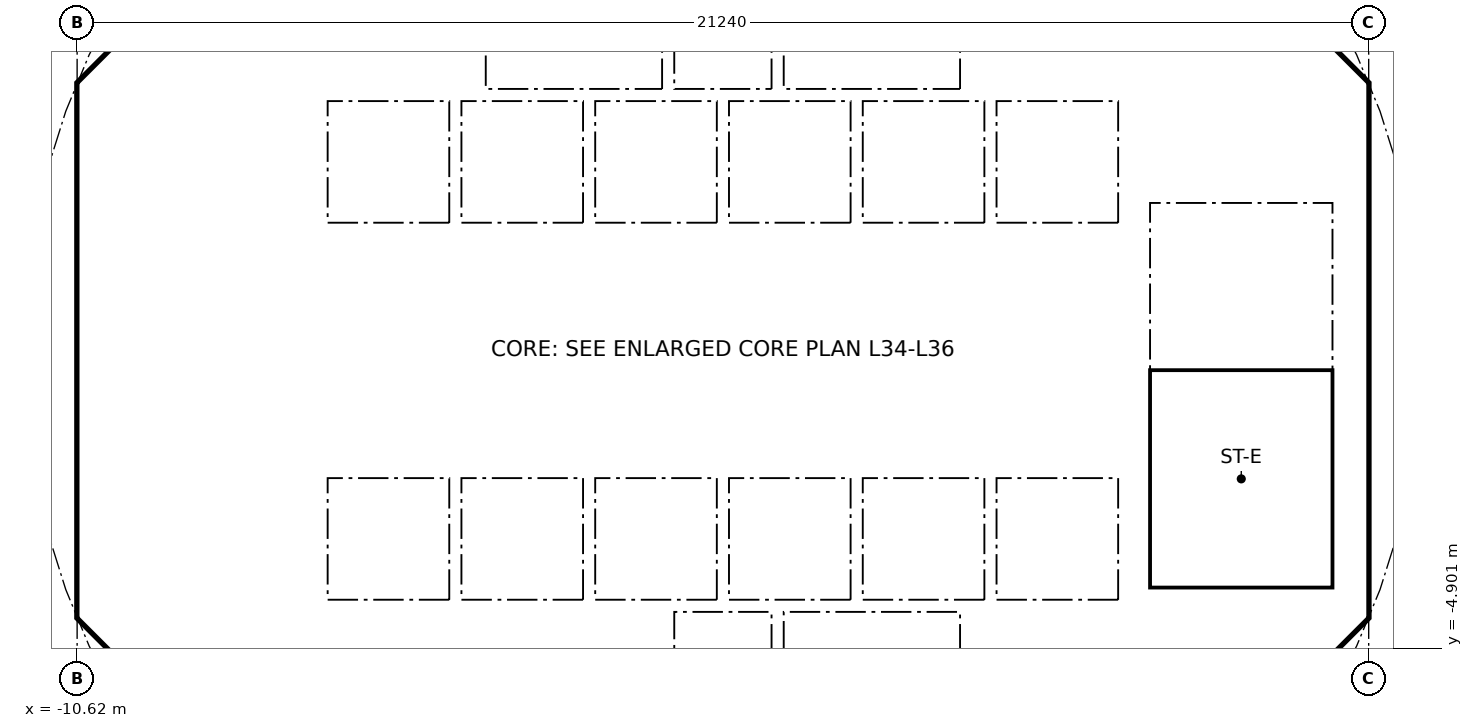
"""IFC4 building model, lengths in metres.
Left out: names, types, materials, properties, quantities, classifications, styles, units other than length and angle.
Written with IfcOpenShell. Run it as: python <this file> out.ifc"""

import sys

from ifc_helpers import new_model, si_unit, direction, frame, frame_2d, origin, place, context, subcontext, project, spatial, polyline, rectangle, outline, extrude, element, fill, save


model = new_model("IFC4")
c1 = context("Model", 3, precision=1e-05, world=origin(), true_north=direction((0.0, 1.0)))
c2 = subcontext(c1, "Body", "Model", "MODEL_VIEW")
j1 = project(units=[si_unit("LENGTHUNIT", "METRE"), si_unit("PLANEANGLEUNIT", "RADIAN")], contexts=[c1])
p1 = place(None, origin())
s1 = spatial("IfcSite", under=j1, at=p1, CompositionType="ELEMENT")
p2 = place(p1, origin())
s2 = spatial("IfcBuilding", under=s1, at=p2, CompositionType="ELEMENT")
p3 = place(p2, frame((0.0, 0.0, 145.5)))
s3 = spatial("IfcBuildingStorey", under=s2, at=p3, CompositionType="ELEMENT", Elevation=145.5)
p4 = place(p3, frame((9.988, 4.613, 0.0), z_axis=(0.0, 0.0, 1.0), x_axis=(-0.707106781187, 0.707106781187, 0.0)))
e1 = element("IfcWall", 1, at=p4, inside=s3, PredefinedType="SHEAR", context=c2, shape_type="SweptSolid", body=[
    extrude(rectangle(XDim=7.602, YDim=0.6, at=frame_2d((3.801, 0.0))), origin(), (0.0, 0.0, 1.0), 3.44),
])
p5 = place(p4, frame((3.201, 0.0, 0.0)))
e2 = element("IfcOpeningElement", 2, at=p5, cuts=e1, PredefinedType="OPENING", context=c2, shape_type="SweptSolid", body=[
    extrude(rectangle(XDim=1.2, YDim=2.1, at=frame_2d((0.6, 1.05))), frame((0.0, 0.31, 0.0), z_axis=(0.0, -1.0, 0.0), x_axis=(1.0, 0.0, 0.0)), (0.0, 0.0, 1.0), 0.62),
])
p6 = place(p3, frame((-4.613, 9.988, 0.0), z_axis=(0.0, 0.0, 1.0), x_axis=(-0.707106781187, -0.707106781187, 0.0)))
e3 = element("IfcWall", 3, at=p6, inside=s3, PredefinedType="SHEAR", context=c2, shape_type="SweptSolid", body=[
    extrude(rectangle(XDim=7.602, YDim=0.6, at=frame_2d((3.801, 0.0))), origin(), (0.0, 0.0, 1.0), 3.44),
])
p7 = place(p6, frame((0.351, 0.0, 0.0)))
e4 = element("IfcOpeningElement", 4, at=p7, cuts=e3, PredefinedType="OPENING", context=c2, shape_type="SweptSolid", body=[
    extrude(rectangle(XDim=1.1, YDim=2.1, at=frame_2d((0.55, 1.05))), frame((0.0, 0.31, 0.0), z_axis=(0.0, -1.0, 0.0), x_axis=(1.0, 0.0, 0.0)), (0.0, 0.0, 1.0), 0.62),
])
p8 = place(p3, frame((-10.325, 3.801, 0.0), z_axis=(0.0, 0.0, 1.0), x_axis=(0.0, -1.0, 0.0)))
e5 = element("IfcWall", 5, at=p8, inside=s3, PredefinedType="SHEAR", context=c2, shape_type="SweptSolid", body=[
    extrude(rectangle(XDim=7.602, YDim=0.6, at=frame_2d((3.801, 0.0))), origin(), (0.0, 0.0, 1.0), 3.44),
])
p9 = place(p8, frame((0.651, 0.0, 0.0)))
e6 = element("IfcOpeningElement", 6, at=p9, cuts=e5, PredefinedType="OPENING", context=c2, shape_type="SweptSolid", body=[
    extrude(rectangle(XDim=1.5, YDim=2.1, at=frame_2d((0.75, 1.05))), frame((0.0, 0.31, 0.0), z_axis=(0.0, -1.0, 0.0), x_axis=(1.0, 0.0, 0.0)), (0.0, 0.0, 1.0), 0.62),
])
p10 = place(p8, frame((5.451, 0.0, 0.0)))
e7 = element("IfcOpeningElement", 7, at=p10, cuts=e5, PredefinedType="OPENING", context=c2, shape_type="SweptSolid", body=[
    extrude(rectangle(XDim=1.5, YDim=2.1, at=frame_2d((0.75, 1.05))), frame((0.0, 0.31, 0.0), z_axis=(0.0, -1.0, 0.0), x_axis=(1.0, 0.0, 0.0)), (0.0, 0.0, 1.0), 0.62),
])
p11 = place(p3, frame((-9.988, -4.613, 0.0), z_axis=(0.0, 0.0, 1.0), x_axis=(0.707106781187, -0.707106781187, 0.0)))
e8 = element("IfcWall", 8, at=p11, inside=s3, PredefinedType="SHEAR", context=c2, shape_type="SweptSolid", body=[
    extrude(rectangle(XDim=7.602, YDim=0.6, at=frame_2d((3.801, 0.0))), origin(), (0.0, 0.0, 1.0), 3.44),
])
p12 = place(p11, frame((6.151, 0.0, 0.0)))
e9 = element("IfcOpeningElement", 9, at=p12, cuts=e8, PredefinedType="OPENING", context=c2, shape_type="SweptSolid", body=[
    extrude(rectangle(XDim=1.1, YDim=2.1, at=frame_2d((0.55, 1.05))), frame((0.0, 0.31, 0.0), z_axis=(0.0, -1.0, 0.0), x_axis=(1.0, 0.0, 0.0)), (0.0, 0.0, 1.0), 0.62),
])
p13 = place(p3, frame((4.613, -9.988, 0.0), z_axis=(0.0, 0.0, 1.0), x_axis=(0.707106781187, 0.707106781187, 0.0)))
e10 = element("IfcWall", 10, at=p13, inside=s3, PredefinedType="SHEAR", context=c2, shape_type="SweptSolid", body=[
    extrude(rectangle(XDim=7.602, YDim=0.6, at=frame_2d((3.801, 0.0))), origin(), (0.0, 0.0, 1.0), 3.44),
])
p14 = place(p13, frame((3.201, 0.0, 0.0)))
e11 = element("IfcOpeningElement", 11, at=p14, cuts=e10, PredefinedType="OPENING", context=c2, shape_type="SweptSolid", body=[
    extrude(rectangle(XDim=1.2, YDim=2.1, at=frame_2d((0.6, 1.05))), frame((0.0, 0.31, 0.0), z_axis=(0.0, -1.0, 0.0), x_axis=(1.0, 0.0, 0.0)), (0.0, 0.0, 1.0), 0.62),
])
p15 = place(p3, frame((-5.8, 4.3, 0.0), z_axis=(0.0, 0.0, 1.0), x_axis=(0.0, 1.0, 0.0)))
e12 = element("IfcWall", 12, at=p15, inside=s3, PredefinedType="PARTITIONING", context=c2, shape_type="SweptSolid", body=[
    extrude(rectangle(XDim=3.927, YDim=0.15, at=frame_2d((1.963, 0.0))), origin(), (0.0, 0.0, 1.0), 3.44),
])
p16 = place(p15, frame((0.413, 0.0, 0.0)))
e13 = element("IfcOpeningElement", 13, at=p16, cuts=e12, PredefinedType="OPENING", context=c2, shape_type="SweptSolid", body=[
    extrude(rectangle(XDim=0.9, YDim=2.1, at=frame_2d((0.45, 1.05))), frame((0.0, 0.085, 0.0), z_axis=(0.0, -1.0, 0.0), x_axis=(1.0, 0.0, 0.0)), (0.0, 0.0, 1.0), 0.17),
])
p17 = place(p15, frame((2.489, 0.0, 0.0)))
e14 = element("IfcOpeningElement", 14, at=p17, cuts=e12, PredefinedType="OPENING", context=c2, shape_type="SweptSolid", body=[
    extrude(rectangle(XDim=0.9, YDim=2.1, at=frame_2d((0.45, 1.05))), frame((0.0, 0.085, 0.0), z_axis=(0.0, -1.0, 0.0), x_axis=(1.0, 0.0, 0.0)), (0.0, 0.0, 1.0), 0.17),
])
p18 = place(p3, frame((4.0, 4.3, 0.0), z_axis=(0.0, 0.0, 1.0), x_axis=(0.0, 1.0, 0.0)))
e15 = element("IfcWall", 15, at=p18, inside=s3, PredefinedType="SOLIDWALL", context=c2, shape_type="SweptSolid", body=[
    extrude(rectangle(XDim=2.2, YDim=0.2, at=frame_2d((1.1, 0.0))), origin(), (0.0, 0.0, 1.0), 3.44),
])
p19 = place(p18, frame((0.55, 0.0, 0.0)))
e16 = element("IfcOpeningElement", 16, at=p19, cuts=e15, PredefinedType="OPENING", context=c2, shape_type="SweptSolid", body=[
    extrude(rectangle(XDim=1.1, YDim=2.1, at=frame_2d((0.55, 1.05))), frame((0.0, 0.11, 0.0), z_axis=(0.0, -1.0, 0.0), x_axis=(1.0, 0.0, 0.0)), (0.0, 0.0, 1.0), 0.22),
])
p20 = place(p3, frame((-4.0, 4.3, 0.0), z_axis=(0.0, 0.0, 1.0), x_axis=(0.0, 1.0, 0.0)))
e17 = element("IfcWall", 17, at=p20, inside=s3, PredefinedType="SOLIDWALL", context=c2, shape_type="SweptSolid", body=[
    extrude(rectangle(XDim=2.2, YDim=0.2, at=frame_2d((1.1, 0.0))), origin(), (0.0, 0.0, 1.0), 3.44),
])
p21 = place(p20, frame((0.55, 0.0, 0.0)))
e18 = element("IfcOpeningElement", 18, at=p21, cuts=e17, PredefinedType="OPENING", context=c2, shape_type="SweptSolid", body=[
    extrude(rectangle(XDim=1.1, YDim=2.1, at=frame_2d((0.55, 1.05))), frame((0.0, 0.11, 0.0), z_axis=(0.0, -1.0, 0.0), x_axis=(1.0, 0.0, 0.0)), (0.0, 0.0, 1.0), 0.22),
])
p22 = place(p3, frame((-6.7, 2.0, 0.0), z_axis=(0.0, 0.0, 1.0), x_axis=(1.0, 0.0, 0.0)))
e19 = element("IfcWall", 19, at=p22, inside=s3, PredefinedType="SOLIDWALL", context=c2, shape_type="SweptSolid", body=[
    extrude(rectangle(XDim=13.4, YDim=0.2, at=frame_2d((6.7, 0.0))), origin(), (0.0, 0.0, 1.0), 3.44),
])
p23 = place(p22, frame((0.65, 0.0, 0.0)))
e20 = element("IfcOpeningElement", 20, at=p23, cuts=e19, PredefinedType="OPENING", context=c2, shape_type="SweptSolid", body=[
    extrude(rectangle(XDim=1.1, YDim=2.1, at=frame_2d((0.55, 1.05))), frame((0.0, 0.11, 0.0), z_axis=(0.0, -1.0, 0.0), x_axis=(1.0, 0.0, 0.0)), (0.0, 0.0, 1.0), 0.22),
])
p24 = place(p22, frame((2.85, 0.0, 0.0)))
e21 = element("IfcOpeningElement", 21, at=p24, cuts=e19, PredefinedType="OPENING", context=c2, shape_type="SweptSolid", body=[
    extrude(rectangle(XDim=1.1, YDim=2.1, at=frame_2d((0.55, 1.05))), frame((0.0, 0.11, 0.0), z_axis=(0.0, -1.0, 0.0), x_axis=(1.0, 0.0, 0.0)), (0.0, 0.0, 1.0), 0.22),
])
p25 = place(p22, frame((5.05, 0.0, 0.0)))
e22 = element("IfcOpeningElement", 22, at=p25, cuts=e19, PredefinedType="OPENING", context=c2, shape_type="SweptSolid", body=[
    extrude(rectangle(XDim=1.1, YDim=2.1, at=frame_2d((0.55, 1.05))), frame((0.0, 0.11, 0.0), z_axis=(0.0, -1.0, 0.0), x_axis=(1.0, 0.0, 0.0)), (0.0, 0.0, 1.0), 0.22),
])
p26 = place(p3, frame((6.7, 4.0, 0.0), z_axis=(0.0, 0.0, 1.0), x_axis=(1.0, 0.0, 0.0)))
e23 = element("IfcWall", 23, at=p26, inside=s3, PredefinedType="SOLIDWALL", context=c2, shape_type="SweptSolid", body=[
    extrude(rectangle(XDim=3.325, YDim=0.2, at=frame_2d((1.662, 0.0))), origin(), (0.0, 0.0, 1.0), 3.44),
])
p27 = place(p26, frame((1.25, 0.0, 0.0)))
e24 = element("IfcOpeningElement", 24, at=p27, cuts=e23, PredefinedType="OPENING", context=c2, shape_type="SweptSolid", body=[
    extrude(rectangle(XDim=1.1, YDim=2.1, at=frame_2d((0.55, 1.05))), frame((0.0, 0.11, 0.0), z_axis=(0.0, -1.0, 0.0), x_axis=(1.0, 0.0, 0.0)), (0.0, 0.0, 1.0), 0.22),
])
p28 = place(p3, frame((-7.0, -7.027, 0.0), z_axis=(0.0, 0.0, 1.0), x_axis=(0.0, 1.0, 0.0)))
e25 = element("IfcWall", 25, at=p28, inside=s3, PredefinedType="PARTITIONING", context=c2, shape_type="SweptSolid", body=[
    extrude(rectangle(XDim=2.927, YDim=0.15, at=frame_2d((1.463, 0.0))), origin(), (0.0, 0.0, 1.0), 3.44),
])
p29 = place(p28, frame((0.976, 0.0, 0.0)))
e26 = element("IfcOpeningElement", 26, at=p29, cuts=e25, PredefinedType="OPENING", context=c2, shape_type="SweptSolid", body=[
    extrude(rectangle(XDim=0.9, YDim=2.1, at=frame_2d((0.45, 1.05))), frame((0.0, 0.085, 0.0), z_axis=(0.0, -1.0, 0.0), x_axis=(1.0, 0.0, 0.0)), (0.0, 0.0, 1.0), 0.17),
])
p30 = place(p3, frame((4.0, -6.5, 0.0), z_axis=(0.0, 0.0, 1.0), x_axis=(0.0, 1.0, 0.0)))
e27 = element("IfcWall", 27, at=p30, inside=s3, PredefinedType="SOLIDWALL", context=c2, shape_type="SweptSolid", body=[
    extrude(rectangle(XDim=2.2, YDim=0.2, at=frame_2d((1.1, 0.0))), origin(), (0.0, 0.0, 1.0), 3.44),
])
p31 = place(p30, frame((0.55, 0.0, 0.0)))
e28 = element("IfcOpeningElement", 28, at=p31, cuts=e27, PredefinedType="OPENING", context=c2, shape_type="SweptSolid", body=[
    extrude(rectangle(XDim=1.1, YDim=2.1, at=frame_2d((0.55, 1.05))), frame((0.0, 0.11, 0.0), z_axis=(0.0, -1.0, 0.0), x_axis=(1.0, 0.0, 0.0)), (0.0, 0.0, 1.0), 0.22),
])
p32 = place(p3, frame((-4.0, -6.5, 0.0), z_axis=(0.0, 0.0, 1.0), x_axis=(0.0, 1.0, 0.0)))
e29 = element("IfcWall", 29, at=p32, inside=s3, PredefinedType="SOLIDWALL", context=c2, shape_type="SweptSolid", body=[
    extrude(rectangle(XDim=2.2, YDim=0.2, at=frame_2d((1.1, 0.0))), origin(), (0.0, 0.0, 1.0), 3.44),
])
p33 = place(p32, frame((0.65, 0.0, 0.0)))
e30 = element("IfcOpeningElement", 30, at=p33, cuts=e29, PredefinedType="OPENING", context=c2, shape_type="SweptSolid", body=[
    extrude(rectangle(XDim=0.9, YDim=2.1, at=frame_2d((0.45, 1.05))), frame((0.0, 0.11, 0.0), z_axis=(0.0, -1.0, 0.0), x_axis=(1.0, 0.0, 0.0)), (0.0, 0.0, 1.0), 0.22),
])
p34 = place(p3, frame((-6.7, -2.0, 0.0), z_axis=(0.0, 0.0, 1.0), x_axis=(1.0, 0.0, 0.0)))
e31 = element("IfcWall", 31, at=p34, inside=s3, PredefinedType="SOLIDWALL", context=c2, shape_type="SweptSolid", body=[
    extrude(rectangle(XDim=13.4, YDim=0.2, at=frame_2d((6.7, 0.0))), origin(), (0.0, 0.0, 1.0), 3.44),
])
p35 = place(p34, frame((0.65, 0.0, 0.0)))
e32 = element("IfcOpeningElement", 32, at=p35, cuts=e31, PredefinedType="OPENING", context=c2, shape_type="SweptSolid", body=[
    extrude(rectangle(XDim=1.1, YDim=2.1, at=frame_2d((0.55, 1.05))), frame((0.0, 0.11, 0.0), z_axis=(0.0, -1.0, 0.0), x_axis=(1.0, 0.0, 0.0)), (0.0, 0.0, 1.0), 0.22),
])
p36 = place(p34, frame((2.85, 0.0, 0.0)))
e33 = element("IfcOpeningElement", 33, at=p36, cuts=e31, PredefinedType="OPENING", context=c2, shape_type="SweptSolid", body=[
    extrude(rectangle(XDim=1.1, YDim=2.1, at=frame_2d((0.55, 1.05))), frame((0.0, 0.11, 0.0), z_axis=(0.0, -1.0, 0.0), x_axis=(1.0, 0.0, 0.0)), (0.0, 0.0, 1.0), 0.22),
])
p37 = place(p3, origin())
e34 = element("IfcWall", 34, at=p37, inside=s3, PredefinedType="SHEAR", context=c2, shape_type="SweptSolid", body=[
    extrude(outline(polyline([(-10.625, -3.801), (-10.025, -3.801), (-10.025, -4.152), (-9.776, -4.401), (-10.2, -4.825), (-10.625, -4.401), (-10.625, -3.801)])), origin(), (0.0, 0.0, 1.0), 3.44),
])
p38 = place(p3, origin())
e35 = element("IfcWall", 35, at=p38, inside=s3, PredefinedType="SHEAR", context=c2, shape_type="SweptSolid", body=[
    extrude(outline(polyline([(-10.2, 4.825), (-9.776, 4.401), (-10.025, 4.152), (-10.025, 3.801), (-10.625, 3.801), (-10.625, 4.401), (-10.2, 4.825)])), origin(), (0.0, 0.0, 1.0), 3.44),
])
p39 = place(p3, origin())
e36 = element("IfcWall", 36, at=p39, inside=s3, PredefinedType="SHEAR", context=c2, shape_type="SweptSolid", body=[
    extrude(outline(polyline([(9.776, -4.401), (10.025, -4.152), (10.025, -3.801), (10.025, 4.152), (9.776, 4.401), (10.2, 4.825), (10.625, 4.401), (10.625, -4.401), (10.2, -4.825), (9.776, -4.401)])), origin(), (0.0, 0.0, 1.0), 3.44),
])
for number, where, z_axis, x_axis in (
    (37, (-10.025, -4.0, 0.0), (0.0, 0.0, 1.0), (1.0, 0.0, 0.0)),
    (38, (-10.025, 4.0, 0.0), (0.0, 0.0, 1.0), (1.0, 0.0, 0.0)),
):
    element("IfcWall", number, at=place(p3, frame(where, z_axis=z_axis, x_axis=x_axis)), inside=s3, PredefinedType="PARTITIONING", context=c2, shape_type="SweptSolid", body=[
        extrude(rectangle(XDim=3.325, YDim=0.2, at=frame_2d((1.662, 0.0))), origin(), (0.0, 0.0, 1.0), 3.44),
    ])
for number, where, z_axis, x_axis in (
    (39, (-0.9, -6.5, 0.0), (0.0, 0.0, 1.0), (0.0, 1.0, 0.0)),
    (40, (0.9, -6.5, 0.0), (0.0, 0.0, 1.0), (0.0, 1.0, 0.0)),
):
    element("IfcWall", number, at=place(p3, frame(where, z_axis=z_axis, x_axis=x_axis)), inside=s3, PredefinedType="SOLIDWALL", context=c2, shape_type="SweptSolid", body=[
        extrude(rectangle(XDim=2.2, YDim=0.2, at=frame_2d((1.1, 0.0))), origin(), (0.0, 0.0, 1.0), 3.44),
    ])
p40 = place(p3, origin())
e41 = element("IfcWall", 41, at=p40, inside=s3, PredefinedType="SOLIDWALL", context=c2, shape_type="SweptSolid", body=[
    extrude(outline(polyline([(-6.7, -2.1), (-6.5, -2.1), (-6.5, -4.1), (-4.5, -4.1), (-4.5, -2.1), (-4.3, -2.1), (-4.3, -4.1), (-2.3, -4.1), (-2.3, -2.1), (-2.1, -2.1), (-2.1, -4.1), (-0.1, -4.1), (-0.1, -2.1), (0.1, -2.1), (0.1, -4.1), (2.1, -4.1), (2.1, -2.1), (2.3, -2.1), (2.3, -4.1), (4.3, -4.1), (4.3, -2.1), (4.5, -2.1), (4.5, -4.1), (6.5, -4.1), (6.5, -2.1), (6.7, -2.1), (6.7, -4.3), (-6.7, -4.3), (-6.7, -2.1)])), origin(), (0.0, 0.0, 1.0), 3.44),
])
for number, where, z_axis, x_axis in (
    (42, (-0.9, 4.3, 0.0), (0.0, 0.0, 1.0), (0.0, 1.0, 0.0)),
    (43, (0.9, 4.3, 0.0), (0.0, 0.0, 1.0), (0.0, 1.0, 0.0)),
):
    element("IfcWall", number, at=place(p3, frame(where, z_axis=z_axis, x_axis=x_axis)), inside=s3, PredefinedType="SOLIDWALL", context=c2, shape_type="SweptSolid", body=[
        extrude(rectangle(XDim=2.2, YDim=0.2, at=frame_2d((1.1, 0.0))), origin(), (0.0, 0.0, 1.0), 3.44),
    ])
p41 = place(p3, origin())
e44 = element("IfcWall", 44, at=p41, inside=s3, PredefinedType="SOLIDWALL", context=c2, shape_type="SweptSolid", body=[
    extrude(outline(polyline([(-6.5, 2.1), (-6.7, 2.1), (-6.7, 4.3), (6.7, 4.3), (6.7, 2.1), (6.5, 2.1), (6.5, 4.1), (4.5, 4.1), (4.5, 2.1), (4.3, 2.1), (4.3, 4.1), (2.3, 4.1), (2.3, 2.1), (2.1, 2.1), (2.1, 4.1), (0.1, 4.1), (0.1, 2.1), (-0.1, 2.1), (-0.1, 4.1), (-2.1, 4.1), (-2.1, 2.1), (-2.3, 2.1), (-2.3, 4.1), (-4.3, 4.1), (-4.3, 2.1), (-4.5, 2.1), (-4.5, 4.1), (-6.5, 4.1), (-6.5, 2.1)])), origin(), (0.0, 0.0, 1.0), 3.44),
])
p42 = place(p3, origin())
e45 = element("IfcWall", 45, at=p42, inside=s3, PredefinedType="SOLIDWALL", context=c2, shape_type="SweptSolid", body=[
    extrude(outline(polyline([(7.025, -3.9), (6.7, -3.9), (6.7, 3.9), (7.025, 3.9), (7.025, -3.9)])), origin(), (0.0, 0.0, 1.0), 3.44),
])
p43 = place(p3, origin())
e46 = element("IfcWall", 46, at=p43, inside=s3, PredefinedType="SOLIDWALL", context=c2, shape_type="SweptSolid", body=[
    extrude(outline(polyline([(10.025, -4.1), (6.7, -4.1), (6.7, -3.9), (10.025, -3.9), (10.025, -4.1)])), origin(), (0.0, 0.0, 1.0), 3.44),
])
p44 = place(p23, origin())
e47 = element("IfcDoor", 47, at=p44, inside=s3, OperationType="DOUBLE_DOOR_SLIDING", PredefinedType="DOOR", context=c2, shape_type="SweptSolid", body=[
    extrude(rectangle(XDim=1.1, YDim=2.1, at=frame_2d((0.55, 1.05))), frame((0.0, 0.025, 0.0), z_axis=(0.0, -1.0, 0.0), x_axis=(1.0, 0.0, 0.0)), (0.0, 0.0, 1.0), 0.05),
])
fill(e20, e47)
p45 = place(p24, origin())
e48 = element("IfcDoor", 48, at=p45, inside=s3, OperationType="DOUBLE_DOOR_SLIDING", PredefinedType="DOOR", context=c2, shape_type="SweptSolid", body=[
    extrude(rectangle(XDim=1.1, YDim=2.1, at=frame_2d((0.55, 1.05))), frame((0.0, 0.025, 0.0), z_axis=(0.0, -1.0, 0.0), x_axis=(1.0, 0.0, 0.0)), (0.0, 0.0, 1.0), 0.05),
])
fill(e21, e48)
p46 = place(p25, origin())
e49 = element("IfcDoor", 49, at=p46, inside=s3, OperationType="DOUBLE_DOOR_SLIDING", PredefinedType="DOOR", context=c2, shape_type="SweptSolid", body=[
    extrude(rectangle(XDim=1.1, YDim=2.1, at=frame_2d((0.55, 1.05))), frame((0.0, 0.025, 0.0), z_axis=(0.0, -1.0, 0.0), x_axis=(1.0, 0.0, 0.0)), (0.0, 0.0, 1.0), 0.05),
])
fill(e22, e49)
p47 = place(p35, origin())
e50 = element("IfcDoor", 50, at=p47, inside=s3, OperationType="DOUBLE_DOOR_SLIDING", PredefinedType="DOOR", context=c2, shape_type="SweptSolid", body=[
    extrude(rectangle(XDim=1.1, YDim=2.1, at=frame_2d((0.55, 1.05))), frame((0.0, 0.025, 0.0), z_axis=(0.0, -1.0, 0.0), x_axis=(1.0, 0.0, 0.0)), (0.0, 0.0, 1.0), 0.05),
])
fill(e32, e50)
p48 = place(p36, origin())
e51 = element("IfcDoor", 51, at=p48, inside=s3, OperationType="DOUBLE_DOOR_SLIDING", PredefinedType="DOOR", context=c2, shape_type="SweptSolid", body=[
    extrude(rectangle(XDim=1.1, YDim=2.1, at=frame_2d((0.55, 1.05))), frame((0.0, 0.025, 0.0), z_axis=(0.0, -1.0, 0.0), x_axis=(1.0, 0.0, 0.0)), (0.0, 0.0, 1.0), 0.05),
])
fill(e33, e51)
p49 = place(p19, origin())
e52 = element("IfcDoor", 52, at=p49, inside=s3, OperationType="DOUBLE_DOOR_SLIDING", PredefinedType="DOOR", context=c2, shape_type="SweptSolid", body=[
    extrude(rectangle(XDim=1.1, YDim=2.1, at=frame_2d((0.55, 1.05))), frame((0.0, 0.025, 0.0), z_axis=(0.0, -1.0, 0.0), x_axis=(1.0, 0.0, 0.0)), (0.0, 0.0, 1.0), 0.05),
])
fill(e16, e52)
p50 = place(p31, origin())
e53 = element("IfcDoor", 53, at=p50, inside=s3, OperationType="DOUBLE_DOOR_SLIDING", PredefinedType="DOOR", context=c2, shape_type="SweptSolid", body=[
    extrude(rectangle(XDim=1.1, YDim=2.1, at=frame_2d((0.55, 1.05))), frame((0.0, 0.025, 0.0), z_axis=(0.0, -1.0, 0.0), x_axis=(1.0, 0.0, 0.0)), (0.0, 0.0, 1.0), 0.05),
])
fill(e28, e53)
p51 = place(p21, origin())
e54 = element("IfcDoor", 54, at=p51, inside=s3, OperationType="DOUBLE_DOOR_SLIDING", PredefinedType="DOOR", context=c2, shape_type="SweptSolid", body=[
    extrude(rectangle(XDim=1.1, YDim=2.1, at=frame_2d((0.55, 1.05))), frame((0.0, 0.025, 0.0), z_axis=(0.0, -1.0, 0.0), x_axis=(1.0, 0.0, 0.0)), (0.0, 0.0, 1.0), 0.05),
])
fill(e18, e54)
p52 = place(p27, frame((1.1, 0.0, 0.0), x_axis=(-1.0, 0.0, 0.0)))
e55 = element("IfcDoor", 55, at=p52, inside=s3, OperationType="SINGLE_SWING_RIGHT", PredefinedType="DOOR", context=c2, shape_type="SweptSolid", body=[
    extrude(rectangle(XDim=1.1, YDim=2.1, at=frame_2d((0.55, 1.05))), frame((0.0, 0.025, 0.0), z_axis=(0.0, -1.0, 0.0), x_axis=(1.0, 0.0, 0.0)), (0.0, 0.0, 1.0), 0.05),
])
fill(e24, e55)
p53 = place(p16, origin())
e56 = element("IfcDoor", 56, at=p53, inside=s3, OperationType="SINGLE_SWING_RIGHT", PredefinedType="DOOR", context=c2, shape_type="SweptSolid", body=[
    extrude(rectangle(XDim=0.9, YDim=2.1, at=frame_2d((0.45, 1.05))), frame((0.0, 0.025, 0.0), z_axis=(0.0, -1.0, 0.0), x_axis=(1.0, 0.0, 0.0)), (0.0, 0.0, 1.0), 0.05),
])
fill(e13, e56)
p54 = place(p9, origin())
e57 = element("IfcDoor", 57, at=p54, inside=s3, OperationType="DOUBLE_DOOR_SINGLE_SWING", PredefinedType="DOOR", context=c2, shape_type="SweptSolid", body=[
    extrude(rectangle(XDim=1.5, YDim=2.1, at=frame_2d((0.75, 1.05))), frame((0.0, 0.025, 0.0), z_axis=(0.0, -1.0, 0.0), x_axis=(1.0, 0.0, 0.0)), (0.0, 0.0, 1.0), 0.05),
])
fill(e6, e57)
p55 = place(p10, origin())
e58 = element("IfcDoor", 58, at=p55, inside=s3, OperationType="DOUBLE_DOOR_SINGLE_SWING", PredefinedType="DOOR", context=c2, shape_type="SweptSolid", body=[
    extrude(rectangle(XDim=1.5, YDim=2.1, at=frame_2d((0.75, 1.05))), frame((0.0, 0.025, 0.0), z_axis=(0.0, -1.0, 0.0), x_axis=(1.0, 0.0, 0.0)), (0.0, 0.0, 1.0), 0.05),
])
fill(e7, e58)
save(model, sys.argv[1])
